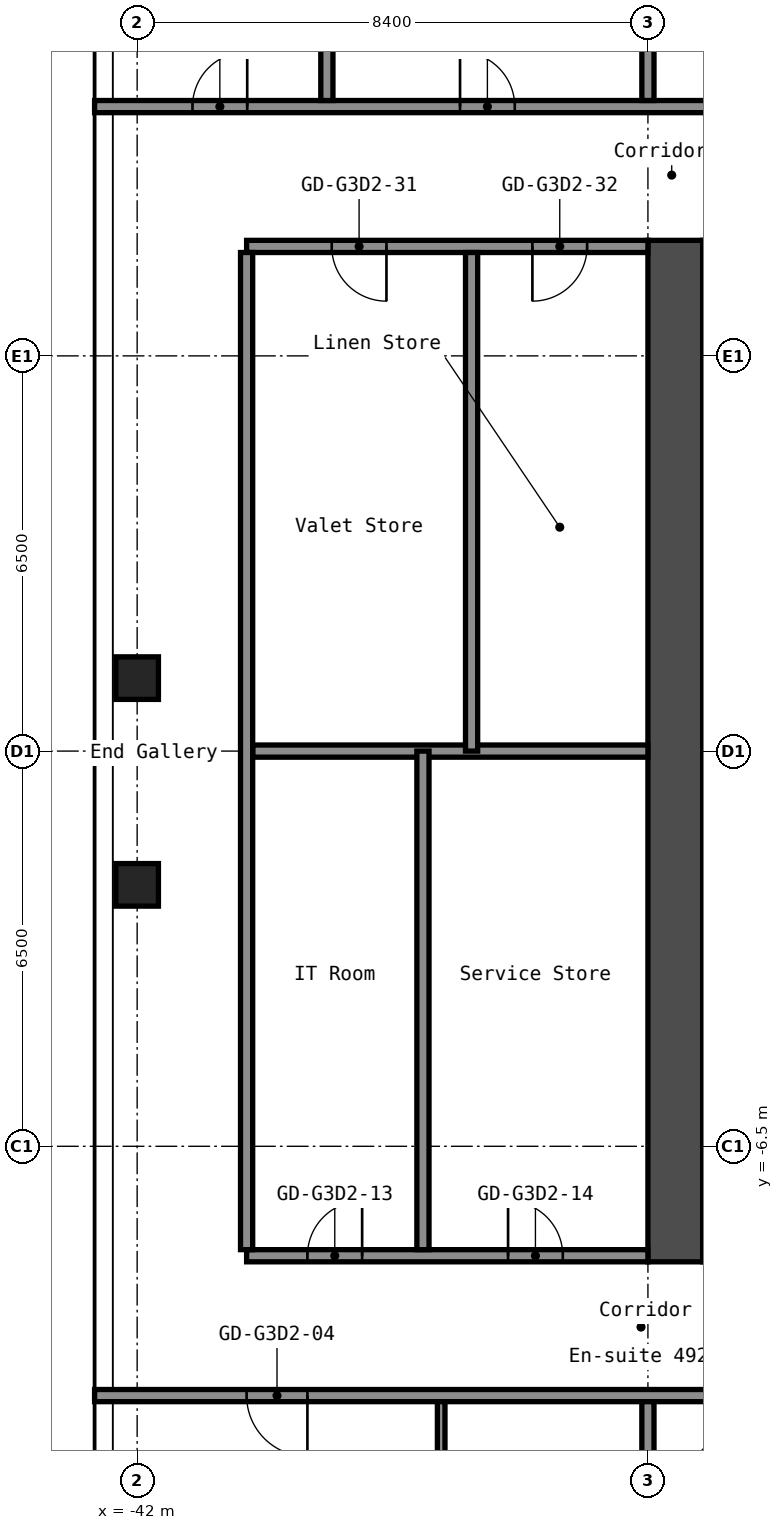
"""IFC4 building model, lengths in metres.
Left out: names, types, materials, properties, quantities, classifications, styles, units other than length and angle.
Written with IfcOpenShell. Run it as: python <this file> out.ifc"""

import sys

from ifc_helpers import new_model, si_unit, direction, frame, frame_2d, origin, origin_2d, place, context, subcontext, project, spatial, rectangle, hollow_rectangle, extrude, element, fill, save


model = new_model("IFC4")
c1 = context("Model", 3, precision=1e-05, world=origin(), true_north=direction((0.0, 1.0)))
c2 = subcontext(c1, "Body", "Model", "MODEL_VIEW")
j1 = project(units=[si_unit("LENGTHUNIT", "METRE"), si_unit("PLANEANGLEUNIT", "RADIAN")], contexts=[c1])
p1 = place(None, origin())
s1 = spatial("IfcSite", under=j1, at=p1, CompositionType="ELEMENT")
p2 = place(p1, origin())
s2 = spatial("IfcBuilding", under=s1, at=p2, CompositionType="ELEMENT")
p3 = place(p2, frame((0.0, 0.0, 172.6)))
s3 = spatial("IfcBuildingStorey", under=s2, at=p3, CompositionType="ELEMENT", Elevation=172.6)
for number, where, z_axis, x_axis in (
    (1, (-42.0, -2.2, 0.0), (0.0, 0.0, 1.0), (1.0, 0.0, 0.0)),
    (2, (-42.0, 1.2, 0.0), (0.0, 0.0, 1.0), (1.0, 0.0, 0.0)),
):
    element("IfcColumn", number, at=place(p3, frame(where, z_axis=z_axis, x_axis=x_axis)), inside=s3, PredefinedType="COLUMN", context=c2, shape_type="SweptSolid", body=[
        extrude(hollow_rectangle(XDim=0.7, YDim=0.7, WallThickness=0.028, at=origin_2d()), origin(), (0.0, 0.0, 1.0), 2.9),
    ])
p4 = place(p3, frame((-33.15, -8.4, 0.0), z_axis=(0.0, 0.0, 1.0), x_axis=(0.0, 1.0, 0.0)))
e3 = element("IfcWall", 3, at=p4, inside=s3, PredefinedType="SHEAR", context=c2, shape_type="SweptSolid", body=[
    extrude(rectangle(XDim=16.8, YDim=0.9, at=frame_2d((8.4, 0.0))), origin(), (0.0, 0.0, 1.0), 2.9),
])
p5 = place(p3, frame((-32.7, 1.325, 0.0), z_axis=(0.0, 0.0, 1.0), x_axis=(1.0, 0.0, 0.0)))
e4 = element("IfcWall", 4, at=p5, inside=s3, PredefinedType="SHEAR", context=c2, shape_type="SweptSolid", body=[
    extrude(rectangle(XDim=5.05, YDim=0.25, at=frame_2d((2.525, 0.0))), origin(), (0.0, 0.0, 1.0), 2.9),
])
p6 = place(p5, frame((3.3, 0.0, 0.0)))
e5 = element("IfcOpeningElement", 5, at=p6, cuts=e4, PredefinedType="OPENING", context=c2, shape_type="SweptSolid", body=[
    extrude(rectangle(XDim=1.2, YDim=2.1, at=frame_2d((0.6, 1.05))), frame((0.0, 0.135, 0.0), z_axis=(0.0, -1.0, 0.0), x_axis=(1.0, 0.0, 0.0)), (0.0, 0.0, 1.0), 0.27),
])
p7 = place(p3, frame((-32.7, -3.625, 0.0), z_axis=(0.0, 0.0, 1.0), x_axis=(1.0, 0.0, 0.0)))
e6 = element("IfcWall", 6, at=p7, inside=s3, PredefinedType="SHEAR", context=c2, shape_type="SweptSolid", body=[
    extrude(rectangle(XDim=4.55, YDim=0.25, at=frame_2d((2.275, 0.0))), origin(), (0.0, 0.0, 1.0), 2.9),
])
p8 = place(p7, frame((2.85, 0.0, 0.0)))
e7 = element("IfcOpeningElement", 7, at=p8, cuts=e6, PredefinedType="OPENING", context=c2, shape_type="SweptSolid", body=[
    extrude(rectangle(XDim=1.1, YDim=2.1, at=frame_2d((0.55, 1.05))), frame((0.0, 0.135, 0.0), z_axis=(0.0, -1.0, 0.0), x_axis=(1.0, 0.0, 0.0)), (0.0, 0.0, 1.0), 0.27),
])
p9 = place(p7, frame((0.6, 0.0, 0.0)))
e8 = element("IfcOpeningElement", 8, at=p9, cuts=e6, PredefinedType="OPENING", context=c2, shape_type="SweptSolid", body=[
    extrude(rectangle(XDim=1.1, YDim=2.1, at=frame_2d((0.55, 1.05))), frame((0.0, 0.135, 0.0), z_axis=(0.0, -1.0, 0.0), x_axis=(1.0, 0.0, 0.0)), (0.0, 0.0, 1.0), 0.27),
])
p10 = place(p3, frame((-32.7, -6.75, 0.0), z_axis=(0.0, 0.0, 1.0), x_axis=(1.0, 0.0, 0.0)))
e9 = element("IfcWall", 9, at=p10, inside=s3, PredefinedType="SHEAR", context=c2, shape_type="SweptSolid", body=[
    extrude(rectangle(XDim=4.55, YDim=1.5, at=frame_2d((2.275, 0.0))), origin(), (0.0, 0.0, 1.0), 2.9),
])
p11 = place(p3, frame((-32.7, -0.875, 0.0), z_axis=(0.0, 0.0, 1.0), x_axis=(1.0, 0.0, 0.0)))
e10 = element("IfcWall", 10, at=p11, inside=s3, PredefinedType="PARTITIONING", context=c2, shape_type="SweptSolid", body=[
    extrude(rectangle(XDim=2.3, YDim=0.15, at=frame_2d((1.15, 0.0))), origin(), (0.0, 0.0, 1.0), 2.9),
])
p12 = place(p3, frame((-42.7, -10.6, 0.0), z_axis=(0.0, 0.0, 1.0), x_axis=(1.0, 0.0, 0.0)))
e11 = element("IfcWall", 11, at=p12, inside=s3, PredefinedType="PARTITIONING", context=c2, shape_type="SweptSolid", body=[
    extrude(rectangle(XDim=25.9, YDim=0.2, at=frame_2d((12.95, 0.0))), origin(), (0.0, 0.0, 1.0), 2.9),
])
p13 = place(p12, frame((2.5, 0.0, 0.0)))
e12 = element("IfcOpeningElement", 12, at=p13, cuts=e11, PredefinedType="OPENING", context=c2, shape_type="SweptSolid", body=[
    extrude(rectangle(XDim=1.0, YDim=2.1, at=frame_2d((0.5, 1.05))), frame((0.0, 0.11, 0.0), z_axis=(0.0, -1.0, 0.0), x_axis=(1.0, 0.0, 0.0)), (0.0, 0.0, 1.0), 0.22),
])
p14 = place(p12, frame((11.95, 0.0, 0.0)))
e13 = element("IfcOpeningElement", 13, at=p14, cuts=e11, PredefinedType="OPENING", context=c2, shape_type="SweptSolid", body=[
    extrude(rectangle(XDim=1.0, YDim=2.1, at=frame_2d((0.5, 1.05))), frame((0.0, 0.11, 0.0), z_axis=(0.0, -1.0, 0.0), x_axis=(1.0, 0.0, 0.0)), (0.0, 0.0, 1.0), 0.22),
])
p15 = place(p12, frame((13.65, 0.0, 0.0)))
e14 = element("IfcOpeningElement", 14, at=p15, cuts=e11, PredefinedType="OPENING", context=c2, shape_type="SweptSolid", body=[
    extrude(rectangle(XDim=1.0, YDim=2.1, at=frame_2d((0.5, 1.05))), frame((0.0, 0.11, 0.0), z_axis=(0.0, -1.0, 0.0), x_axis=(1.0, 0.0, 0.0)), (0.0, 0.0, 1.0), 0.22),
])
p16 = place(p12, frame((22.9, 0.0, 0.0)))
e15 = element("IfcOpeningElement", 15, at=p16, cuts=e11, PredefinedType="OPENING", context=c2, shape_type="SweptSolid", body=[
    extrude(rectangle(XDim=1.0, YDim=2.1, at=frame_2d((0.5, 1.05))), frame((0.0, 0.11, 0.0), z_axis=(0.0, -1.0, 0.0), x_axis=(1.0, 0.0, 0.0)), (0.0, 0.0, 1.0), 0.22),
])
p17 = place(p3, frame((-40.2, -8.3, 0.0), z_axis=(0.0, 0.0, 1.0), x_axis=(1.0, 0.0, 0.0)))
e16 = element("IfcWall", 16, at=p17, inside=s3, PredefinedType="PARTITIONING", context=c2, shape_type="SweptSolid", body=[
    extrude(rectangle(XDim=6.6, YDim=0.2, at=frame_2d((3.3, 0.0))), origin(), (0.0, 0.0, 1.0), 2.9),
])
p18 = place(p17, frame((1.0, 0.0, 0.0)))
e17 = element("IfcOpeningElement", 17, at=p18, cuts=e16, PredefinedType="OPENING", context=c2, shape_type="SweptSolid", body=[
    extrude(rectangle(XDim=0.9, YDim=2.1, at=frame_2d((0.45, 1.05))), frame((0.0, 0.11, 0.0), z_axis=(0.0, -1.0, 0.0), x_axis=(1.0, 0.0, 0.0)), (0.0, 0.0, 1.0), 0.22),
])
p19 = place(p17, frame((4.3, 0.0, 0.0)))
e18 = element("IfcOpeningElement", 18, at=p19, cuts=e16, PredefinedType="OPENING", context=c2, shape_type="SweptSolid", body=[
    extrude(rectangle(XDim=0.9, YDim=2.1, at=frame_2d((0.45, 1.05))), frame((0.0, 0.11, 0.0), z_axis=(0.0, -1.0, 0.0), x_axis=(1.0, 0.0, 0.0)), (0.0, 0.0, 1.0), 0.22),
])
p20 = place(p3, frame((-40.1, 0.0, 0.0), z_axis=(0.0, 0.0, 1.0), x_axis=(1.0, 0.0, 0.0)))
e19 = element("IfcWall", 19, at=p20, inside=s3, PredefinedType="PARTITIONING", context=c2, shape_type="SweptSolid", body=[
    extrude(rectangle(XDim=6.5, YDim=0.2, at=frame_2d((3.25, 0.0))), origin(), (0.0, 0.0, 1.0), 2.9),
])
p21 = place(p3, frame((-40.2, 8.3, 0.0), z_axis=(0.0, 0.0, 1.0), x_axis=(1.0, 0.0, 0.0)))
e20 = element("IfcWall", 20, at=p21, inside=s3, PredefinedType="PARTITIONING", context=c2, shape_type="SweptSolid", body=[
    extrude(rectangle(XDim=6.6, YDim=0.2, at=frame_2d((3.3, 0.0))), origin(), (0.0, 0.0, 1.0), 2.9),
])
p22 = place(p21, frame((1.4, 0.0, 0.0)))
e21 = element("IfcOpeningElement", 21, at=p22, cuts=e20, PredefinedType="OPENING", context=c2, shape_type="SweptSolid", body=[
    extrude(rectangle(XDim=0.9, YDim=2.1, at=frame_2d((0.45, 1.05))), frame((0.0, 0.11, 0.0), z_axis=(0.0, -1.0, 0.0), x_axis=(1.0, 0.0, 0.0)), (0.0, 0.0, 1.0), 0.22),
])
p23 = place(p21, frame((4.7, 0.0, 0.0)))
e22 = element("IfcOpeningElement", 22, at=p23, cuts=e20, PredefinedType="OPENING", context=c2, shape_type="SweptSolid", body=[
    extrude(rectangle(XDim=0.9, YDim=2.1, at=frame_2d((0.45, 1.05))), frame((0.0, 0.11, 0.0), z_axis=(0.0, -1.0, 0.0), x_axis=(1.0, 0.0, 0.0)), (0.0, 0.0, 1.0), 0.22),
])
p24 = place(p3, frame((-42.7, 10.6, 0.0), z_axis=(0.0, 0.0, 1.0), x_axis=(1.0, 0.0, 0.0)))
e23 = element("IfcWall", 23, at=p24, inside=s3, PredefinedType="PARTITIONING", context=c2, shape_type="SweptSolid", body=[
    extrude(rectangle(XDim=25.9, YDim=0.2, at=frame_2d((12.95, 0.0))), origin(), (0.0, 0.0, 1.0), 2.9),
])
p25 = place(p24, frame((1.61, 0.0, 0.0)))
e24 = element("IfcOpeningElement", 24, at=p25, cuts=e23, PredefinedType="OPENING", context=c2, shape_type="SweptSolid", body=[
    extrude(rectangle(XDim=0.9, YDim=2.1, at=frame_2d((0.45, 1.05))), frame((0.0, 0.11, 0.0), z_axis=(0.0, -1.0, 0.0), x_axis=(1.0, 0.0, 0.0)), (0.0, 0.0, 1.0), 0.22),
])
p26 = place(p24, frame((6.01, 0.0, 0.0)))
e25 = element("IfcOpeningElement", 25, at=p26, cuts=e23, PredefinedType="OPENING", context=c2, shape_type="SweptSolid", body=[
    extrude(rectangle(XDim=0.9, YDim=2.1, at=frame_2d((0.45, 1.05))), frame((0.0, 0.11, 0.0), z_axis=(0.0, -1.0, 0.0), x_axis=(1.0, 0.0, 0.0)), (0.0, 0.0, 1.0), 0.22),
])
p27 = place(p24, frame((12.8, 0.0, 0.0)))
e26 = element("IfcOpeningElement", 26, at=p27, cuts=e23, PredefinedType="OPENING", context=c2, shape_type="SweptSolid", body=[
    extrude(rectangle(XDim=1.0, YDim=2.1, at=frame_2d((0.5, 1.05))), frame((0.0, 0.11, 0.0), z_axis=(0.0, -1.0, 0.0), x_axis=(1.0, 0.0, 0.0)), (0.0, 0.0, 1.0), 0.22),
])
p28 = place(p24, frame((21.2, 0.0, 0.0)))
e27 = element("IfcOpeningElement", 27, at=p28, cuts=e23, PredefinedType="OPENING", context=c2, shape_type="SweptSolid", body=[
    extrude(rectangle(XDim=1.0, YDim=2.1, at=frame_2d((0.5, 1.05))), frame((0.0, 0.11, 0.0), z_axis=(0.0, -1.0, 0.0), x_axis=(1.0, 0.0, 0.0)), (0.0, 0.0, 1.0), 0.22),
])
p29 = place(p3, frame((-40.2, -8.2, 0.0), z_axis=(0.0, 0.0, 1.0), x_axis=(0.0, 1.0, 0.0)))
e28 = element("IfcWall", 28, at=p29, inside=s3, PredefinedType="PARTITIONING", context=c2, shape_type="SweptSolid", body=[
    extrude(rectangle(XDim=16.4, YDim=0.2, at=frame_2d((8.2, 0.0))), origin(), (0.0, 0.0, 1.0), 2.9),
])
p30 = place(p3, frame((-38.88, 10.7, 0.0), z_axis=(0.0, 0.0, 1.0), x_axis=(0.0, 1.0, 0.0)))
e29 = element("IfcWall", 29, at=p30, inside=s3, PredefinedType="PARTITIONING", context=c2, shape_type="SweptSolid", body=[
    extrude(rectangle(XDim=7.6, YDim=0.2, at=frame_2d((3.8, 0.0))), origin(), (0.0, 0.0, 1.0), 2.9),
])
p31 = place(p3, frame((-37.3, -8.2, 0.0), z_axis=(0.0, 0.0, 1.0), x_axis=(0.0, 1.0, 0.0)))
e30 = element("IfcWall", 30, at=p31, inside=s3, PredefinedType="PARTITIONING", context=c2, shape_type="SweptSolid", body=[
    extrude(rectangle(XDim=8.2, YDim=0.2, at=frame_2d((4.1, 0.0))), origin(), (0.0, 0.0, 1.0), 2.9),
])
p32 = place(p3, frame((-37.0, -14.0, 0.0), z_axis=(0.0, 0.0, 1.0), x_axis=(0.0, 1.0, 0.0)))
e31 = element("IfcWall", 31, at=p32, inside=s3, PredefinedType="PARTITIONING", context=c2, shape_type="SweptSolid", body=[
    extrude(rectangle(XDim=3.3, YDim=0.125, at=frame_2d((1.65, 0.0))), origin(), (0.0, 0.0, 1.0), 2.9),
])
p33 = place(p3, frame((-36.5, 0.0, 0.0), z_axis=(0.0, 0.0, 1.0), x_axis=(0.0, 1.0, 0.0)))
e32 = element("IfcWall", 32, at=p33, inside=s3, PredefinedType="PARTITIONING", context=c2, shape_type="SweptSolid", body=[
    extrude(rectangle(XDim=8.2, YDim=0.2, at=frame_2d((4.1, 0.0))), origin(), (0.0, 0.0, 1.0), 2.9),
])
p34 = place(p3, frame((-33.6, -19.3, 0.0), z_axis=(0.0, 0.0, 1.0), x_axis=(0.0, 1.0, 0.0)))
e33 = element("IfcWall", 33, at=p34, inside=s3, PredefinedType="PARTITIONING", context=c2, shape_type="SweptSolid", body=[
    extrude(rectangle(XDim=8.6, YDim=0.2, at=frame_2d((4.3, 0.0))), origin(), (0.0, 0.0, 1.0), 2.9),
])
p35 = place(p3, frame((-33.6, 10.7, 0.0), z_axis=(0.0, 0.0, 1.0), x_axis=(0.0, 1.0, 0.0)))
e34 = element("IfcWall", 34, at=p35, inside=s3, PredefinedType="PARTITIONING", context=c2, shape_type="SweptSolid", body=[
    extrude(rectangle(XDim=7.6, YDim=0.2, at=frame_2d((3.8, 0.0))), origin(), (0.0, 0.0, 1.0), 2.9),
])
p36 = place(p13, origin())
e35 = element("IfcDoor", 35, at=p36, inside=s3, OperationType="SINGLE_SWING_RIGHT", PredefinedType="DOOR", context=c2, shape_type="SweptSolid", body=[
    extrude(rectangle(XDim=1.0, YDim=2.1, at=frame_2d((0.5, 1.05))), frame((0.0, 0.025, 0.0), z_axis=(0.0, -1.0, 0.0), x_axis=(1.0, 0.0, 0.0)), (0.0, 0.0, 1.0), 0.05),
])
fill(e12, e35)
p37 = place(p18, origin())
e36 = element("IfcDoor", 36, at=p37, inside=s3, OperationType="SINGLE_SWING_LEFT", PredefinedType="DOOR", context=c2, shape_type="SweptSolid", body=[
    extrude(rectangle(XDim=0.9, YDim=2.1, at=frame_2d((0.45, 1.05))), frame((0.0, 0.025, 0.0), z_axis=(0.0, -1.0, 0.0), x_axis=(1.0, 0.0, 0.0)), (0.0, 0.0, 1.0), 0.05),
])
fill(e17, e36)
p38 = place(p19, origin())
e37 = element("IfcDoor", 37, at=p38, inside=s3, OperationType="SINGLE_SWING_RIGHT", PredefinedType="DOOR", context=c2, shape_type="SweptSolid", body=[
    extrude(rectangle(XDim=0.9, YDim=2.1, at=frame_2d((0.45, 1.05))), frame((0.0, 0.025, 0.0), z_axis=(0.0, -1.0, 0.0), x_axis=(1.0, 0.0, 0.0)), (0.0, 0.0, 1.0), 0.05),
])
fill(e18, e37)
p39 = place(p22, origin())
e38 = element("IfcDoor", 38, at=p39, inside=s3, OperationType="SINGLE_SWING_RIGHT", PredefinedType="DOOR", context=c2, shape_type="SweptSolid", body=[
    extrude(rectangle(XDim=0.9, YDim=2.1, at=frame_2d((0.45, 1.05))), frame((0.0, 0.025, 0.0), z_axis=(0.0, -1.0, 0.0), x_axis=(1.0, 0.0, 0.0)), (0.0, 0.0, 1.0), 0.05),
])
fill(e21, e38)
p40 = place(p23, origin())
e39 = element("IfcDoor", 39, at=p40, inside=s3, OperationType="SINGLE_SWING_LEFT", PredefinedType="DOOR", context=c2, shape_type="SweptSolid", body=[
    extrude(rectangle(XDim=0.9, YDim=2.1, at=frame_2d((0.45, 1.05))), frame((0.0, 0.025, 0.0), z_axis=(0.0, -1.0, 0.0), x_axis=(1.0, 0.0, 0.0)), (0.0, 0.0, 1.0), 0.05),
])
fill(e22, e39)
p41 = place(p25, origin())
e40 = element("IfcDoor", 40, at=p41, inside=s3, OperationType="SINGLE_SWING_LEFT", PredefinedType="DOOR", context=c2, shape_type="SweptSolid", body=[
    extrude(rectangle(XDim=0.9, YDim=2.1, at=frame_2d((0.45, 1.05))), frame((0.0, 0.025, 0.0), z_axis=(0.0, -1.0, 0.0), x_axis=(1.0, 0.0, 0.0)), (0.0, 0.0, 1.0), 0.05),
])
fill(e24, e40)
p42 = place(p26, origin())
e41 = element("IfcDoor", 41, at=p42, inside=s3, OperationType="SINGLE_SWING_RIGHT", PredefinedType="DOOR", context=c2, shape_type="SweptSolid", body=[
    extrude(rectangle(XDim=0.9, YDim=2.1, at=frame_2d((0.45, 1.05))), frame((0.0, 0.025, 0.0), z_axis=(0.0, -1.0, 0.0), x_axis=(1.0, 0.0, 0.0)), (0.0, 0.0, 1.0), 0.05),
])
fill(e25, e41)
save(model, sys.argv[1])
